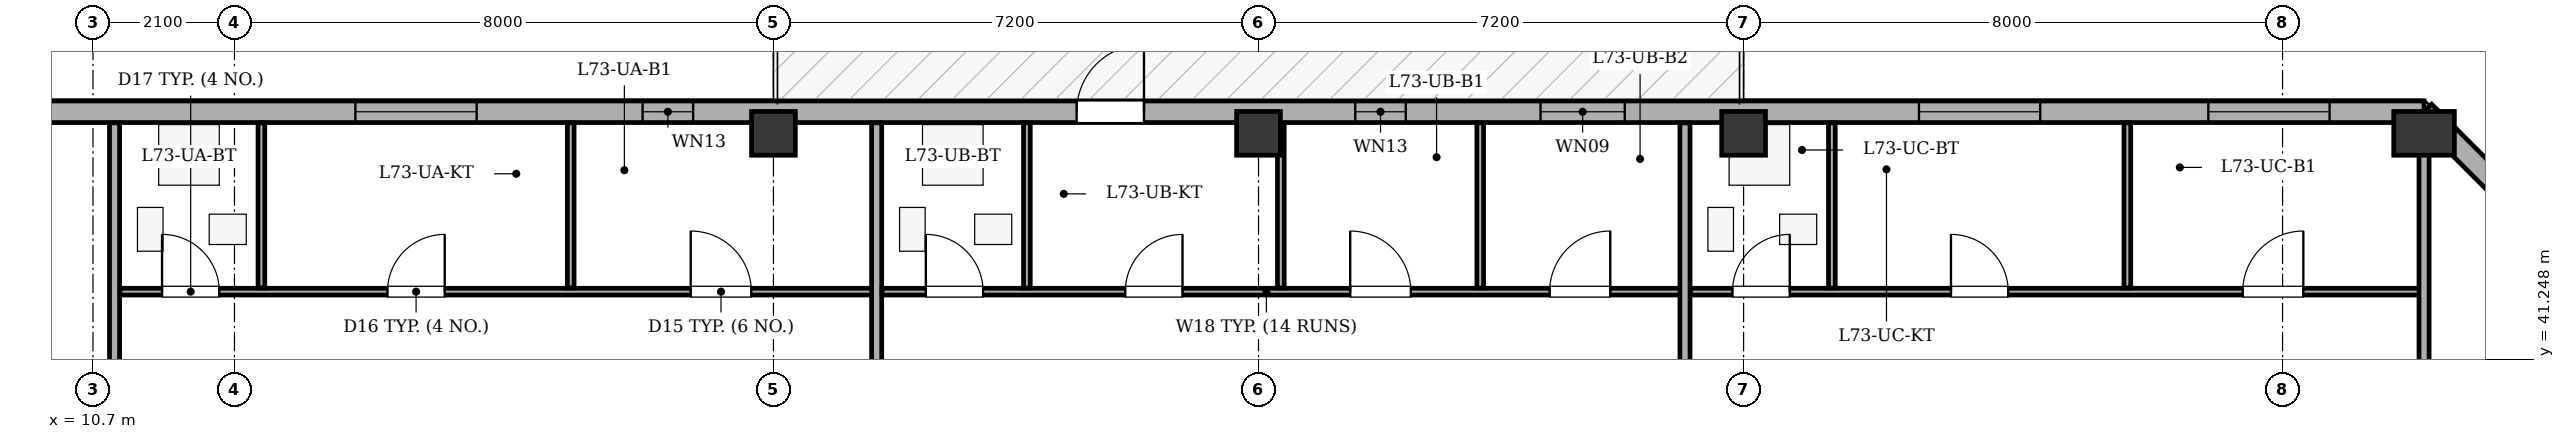
"""IFC4 building model, lengths in metres.
Left out: names, types, materials, properties, quantities, classifications, styles, units other than length and angle.
Written with IfcOpenShell. Run it as: python <this file> out.ifc"""

import sys

from ifc_helpers import new_model, si_unit, direction, frame, frame_2d, origin, origin_2d, place, context, subcontext, project, spatial, rectangle, extrude, element, fill, save


model = new_model("IFC4")
c1 = context("Model", 3, precision=1e-05, world=origin(), true_north=direction((0.0, 1.0)))
c2 = subcontext(c1, "Body", "Model", "MODEL_VIEW")
j1 = project(units=[si_unit("LENGTHUNIT", "METRE"), si_unit("PLANEANGLEUNIT", "RADIAN")], contexts=[c1])
p1 = place(None, origin())
s1 = spatial("IfcSite", under=j1, at=p1, CompositionType="ELEMENT")
p2 = place(p1, origin())
s2 = spatial("IfcBuilding", under=s1, at=p2, CompositionType="ELEMENT")
p3 = place(p2, frame((0.0, 0.0, 275.5)))
s3 = spatial("IfcBuildingStorey", under=s2, at=p3, CompositionType="ELEMENT", Elevation=275.5)
for number, where, z_axis, x_axis in (
    (1, (20.8, 44.6, 0.0), (0.0, 0.0, 1.0), (1.0, 0.0, 0.0)),
    (2, (28.0, 44.6, 0.0), (0.0, 0.0, 1.0), (1.0, 0.0, 0.0)),
    (3, (35.2, 44.6, 0.0), (0.0, 0.0, 1.0), (1.0, 0.0, 0.0)),
):
    element("IfcColumn", number, at=place(p3, frame(where, z_axis=z_axis, x_axis=x_axis)), inside=s3, PredefinedType="COLUMN", context=c2, shape_type="SweptSolid", body=[
        extrude(rectangle(XDim=0.65, YDim=0.65, at=origin_2d()), origin(), (0.0, 0.0, 1.0), 3.4),
    ])
p4 = place(p3, frame((45.3, 44.6, 0.0), z_axis=(0.0, 0.0, 1.0), x_axis=(1.0, 0.0, 0.0)))
e4 = element("IfcColumn", 4, at=p4, inside=s3, PredefinedType="COLUMN", context=c2, shape_type="SweptSolid", body=[
    extrude(rectangle(XDim=0.65, YDim=0.9, at=origin_2d()), origin(), (0.0, 0.0, 1.0), 3.4),
])
p5 = place(p3, frame((8.3, 44.92, 0.0), z_axis=(0.0, 0.0, 1.0), x_axis=(1.0, 0.0, 0.0)))
e5 = element("IfcWall", 5, at=p5, inside=s3, PredefinedType="STANDARD", context=c2, shape_type="SweptSolid", body=[
    extrude(rectangle(XDim=37.0, YDim=0.32, at=frame_2d((18.5, 0.0))), origin(), (0.0, 0.0, 1.0), 2.725),
])
p6 = place(p5, frame((17.0, 0.0, 0.0)))
e6 = element("IfcOpeningElement", 6, at=p6, cuts=e5, PredefinedType="OPENING", context=c2, shape_type="SweptSolid", body=[
    extrude(rectangle(XDim=1.0, YDim=2.02, at=frame_2d((0.5, 1.01))), frame((0.0, 0.17, 0.0), z_axis=(0.0, -1.0, 0.0), x_axis=(1.0, 0.0, 0.0)), (0.0, 0.0, 1.0), 0.34),
])
p7 = place(p5, frame((6.295, 0.0, 0.75)))
e7 = element("IfcOpeningElement", 7, at=p7, cuts=e5, PredefinedType="OPENING", context=c2, shape_type="SweptSolid", body=[
    extrude(rectangle(XDim=1.8, YDim=1.7, at=frame_2d((0.9, 0.85))), frame((0.0, 0.17, 0.0), z_axis=(0.0, -1.0, 0.0), x_axis=(1.0, 0.0, 0.0)), (0.0, 0.0, 1.0), 0.34),
])
p8 = place(p5, frame((23.886, 0.0, 0.75)))
e8 = element("IfcOpeningElement", 8, at=p8, cuts=e5, PredefinedType="OPENING", context=c2, shape_type="SweptSolid", body=[
    extrude(rectangle(XDim=1.25, YDim=1.7, at=frame_2d((0.625, 0.85))), frame((0.0, 0.17, 0.0), z_axis=(0.0, -1.0, 0.0), x_axis=(1.0, 0.0, 0.0)), (0.0, 0.0, 1.0), 0.34),
])
p9 = place(p5, frame((29.503, 0.0, 0.75)))
e9 = element("IfcOpeningElement", 9, at=p9, cuts=e5, PredefinedType="OPENING", context=c2, shape_type="SweptSolid", body=[
    extrude(rectangle(XDim=1.8, YDim=1.7, at=frame_2d((0.9, 0.85))), frame((0.0, 0.17, 0.0), z_axis=(0.0, -1.0, 0.0), x_axis=(1.0, 0.0, 0.0)), (0.0, 0.0, 1.0), 0.34),
])
p10 = place(p5, frame((33.798, 0.0, 0.75)))
e10 = element("IfcOpeningElement", 10, at=p10, cuts=e5, PredefinedType="OPENING", context=c2, shape_type="SweptSolid", body=[
    extrude(rectangle(XDim=1.8, YDim=1.7, at=frame_2d((0.9, 0.85))), frame((0.0, 0.17, 0.0), z_axis=(0.0, -1.0, 0.0), x_axis=(1.0, 0.0, 0.0)), (0.0, 0.0, 1.0), 0.34),
])
p11 = place(p5, frame((10.558, 0.0, 0.75)))
e11 = element("IfcOpeningElement", 11, at=p11, cuts=e5, PredefinedType="OPENING", context=c2, shape_type="SweptSolid", body=[
    extrude(rectangle(XDim=0.75, YDim=1.45, at=frame_2d((0.375, 0.725))), frame((0.0, 0.17, 0.0), z_axis=(0.0, -1.0, 0.0), x_axis=(1.0, 0.0, 0.0)), (0.0, 0.0, 1.0), 0.34),
])
p12 = place(p5, frame((21.136, 0.0, 0.75)))
e12 = element("IfcOpeningElement", 12, at=p12, cuts=e5, PredefinedType="OPENING", context=c2, shape_type="SweptSolid", body=[
    extrude(rectangle(XDim=0.75, YDim=1.45, at=frame_2d((0.375, 0.725))), frame((0.0, 0.17, 0.0), z_axis=(0.0, -1.0, 0.0), x_axis=(1.0, 0.0, 0.0)), (0.0, 0.0, 1.0), 0.34),
])
p13 = place(p3, frame((45.3, 44.92, 0.0), z_axis=(0.0, 0.0, 1.0), x_axis=(0.70712937715, -0.707084184501, 0.0)))
e13 = element("IfcWall", 13, at=p13, inside=s3, PredefinedType="STANDARD", context=c2, shape_type="SweptSolid", body=[
    extrude(rectangle(XDim=5.402, YDim=0.32, at=frame_2d((2.701, 0.0))), origin(), (0.0, 0.0, 1.0), 2.725),
])
p14 = place(p13, frame((2.001, 0.0, 0.75)))
e14 = element("IfcOpeningElement", 14, at=p14, cuts=e13, PredefinedType="OPENING", context=c2, shape_type="SweptSolid", body=[
    extrude(rectangle(XDim=1.4, YDim=1.65, at=frame_2d((0.7, 0.825))), frame((0.0, 0.17, 0.0), z_axis=(0.0, -1.0, 0.0), x_axis=(1.0, 0.0, 0.0)), (0.0, 0.0, 1.0), 0.34),
])
p15 = place(p3, frame((11.02, 36.1, 0.0), z_axis=(0.0, 0.0, 1.0), x_axis=(0.0, 1.0, 0.0)))
e15 = element("IfcWall", 15, at=p15, inside=s3, PredefinedType="PARTITIONING", context=c2, shape_type="SweptSolid", body=[
    extrude(rectangle(XDim=8.655, YDim=0.15, at=frame_2d((4.327, 0.0))), origin(), (0.0, 0.0, 1.0), 3.1),
])
p16 = place(p3, frame((11.1, 42.25, 0.0), z_axis=(0.0, 0.0, 1.0), x_axis=(1.0, 0.0, 0.0)))
e16 = element("IfcWall", 16, at=p16, inside=s3, PredefinedType="PARTITIONING", context=c2, shape_type="SweptSolid", body=[
    extrude(rectangle(XDim=11.272, YDim=0.1, at=frame_2d((5.636, 0.0))), origin(), (0.0, 0.0, 1.0), 3.1),
])
p17 = place(p16, frame((0.625, 0.0, 0.0)))
e17 = element("IfcOpeningElement", 17, at=p17, cuts=e16, PredefinedType="OPENING", context=c2, shape_type="SweptSolid", body=[
    extrude(rectangle(XDim=0.85, YDim=2.05, at=frame_2d((0.425, 1.025))), frame((0.0, 0.06, 0.0), z_axis=(0.0, -1.0, 0.0), x_axis=(1.0, 0.0, 0.0)), (0.0, 0.0, 1.0), 0.12),
])
p18 = place(p16, frame((3.971, 0.0, 0.0)))
e18 = element("IfcOpeningElement", 18, at=p18, cuts=e16, PredefinedType="OPENING", context=c2, shape_type="SweptSolid", body=[
    extrude(rectangle(XDim=0.85, YDim=2.05, at=frame_2d((0.425, 1.025))), frame((0.0, 0.06, 0.0), z_axis=(0.0, -1.0, 0.0), x_axis=(1.0, 0.0, 0.0)), (0.0, 0.0, 1.0), 0.12),
])
p19 = place(p16, frame((8.472, 0.0, 0.0)))
e19 = element("IfcOpeningElement", 19, at=p19, cuts=e16, PredefinedType="OPENING", context=c2, shape_type="SweptSolid", body=[
    extrude(rectangle(XDim=0.9, YDim=2.05, at=frame_2d((0.45, 1.025))), frame((0.0, 0.06, 0.0), z_axis=(0.0, -1.0, 0.0), x_axis=(1.0, 0.0, 0.0)), (0.0, 0.0, 1.0), 0.12),
])
p20 = place(p3, frame((13.2, 42.305, 0.0), z_axis=(0.0, 0.0, 1.0), x_axis=(0.0, 1.0, 0.0)))
e20 = element("IfcWall", 20, at=p20, inside=s3, PredefinedType="PARTITIONING", context=c2, shape_type="SweptSolid", body=[
    extrude(rectangle(XDim=2.45, YDim=0.1, at=frame_2d((1.225, 0.0))), origin(), (0.0, 0.0, 1.0), 3.1),
])
p21 = place(p3, frame((17.791, 42.305, 0.0), z_axis=(0.0, 0.0, 1.0), x_axis=(0.0, 1.0, 0.0)))
e21 = element("IfcWall", 21, at=p21, inside=s3, PredefinedType="PARTITIONING", context=c2, shape_type="SweptSolid", body=[
    extrude(rectangle(XDim=2.45, YDim=0.1, at=frame_2d((1.225, 0.0))), origin(), (0.0, 0.0, 1.0), 2.725),
])
p22 = place(p3, frame((22.332, 36.1, 0.0), z_axis=(0.0, 0.0, 1.0), x_axis=(0.0, 1.0, 0.0)))
e22 = element("IfcWall", 22, at=p22, inside=s3, PredefinedType="PARTITIONING", context=c2, shape_type="SweptSolid", body=[
    extrude(rectangle(XDim=8.655, YDim=0.15, at=frame_2d((4.327, 0.0))), origin(), (0.0, 0.0, 1.0), 2.725),
])
p23 = place(p3, frame((22.412, 42.25, 0.0), z_axis=(0.0, 0.0, 1.0), x_axis=(1.0, 0.0, 0.0)))
e23 = element("IfcWall", 23, at=p23, inside=s3, PredefinedType="PARTITIONING", context=c2, shape_type="SweptSolid", body=[
    extrude(rectangle(XDim=11.958, YDim=0.1, at=frame_2d((5.979, 0.0))), origin(), (0.0, 0.0, 1.0), 3.1),
])
p24 = place(p23, frame((0.65, 0.0, 0.0)))
e24 = element("IfcOpeningElement", 24, at=p24, cuts=e23, PredefinedType="OPENING", context=c2, shape_type="SweptSolid", body=[
    extrude(rectangle(XDim=0.85, YDim=2.05, at=frame_2d((0.425, 1.025))), frame((0.0, 0.06, 0.0), z_axis=(0.0, -1.0, 0.0), x_axis=(1.0, 0.0, 0.0)), (0.0, 0.0, 1.0), 0.12),
])
p25 = place(p23, frame((3.61, 0.0, 0.0)))
e25 = element("IfcOpeningElement", 25, at=p25, cuts=e23, PredefinedType="OPENING", context=c2, shape_type="SweptSolid", body=[
    extrude(rectangle(XDim=0.85, YDim=2.05, at=frame_2d((0.425, 1.025))), frame((0.0, 0.06, 0.0), z_axis=(0.0, -1.0, 0.0), x_axis=(1.0, 0.0, 0.0)), (0.0, 0.0, 1.0), 0.12),
])
p26 = place(p23, frame((6.949, 0.0, 0.0)))
e26 = element("IfcOpeningElement", 26, at=p26, cuts=e23, PredefinedType="OPENING", context=c2, shape_type="SweptSolid", body=[
    extrude(rectangle(XDim=0.9, YDim=2.05, at=frame_2d((0.45, 1.025))), frame((0.0, 0.06, 0.0), z_axis=(0.0, -1.0, 0.0), x_axis=(1.0, 0.0, 0.0)), (0.0, 0.0, 1.0), 0.12),
])
p27 = place(p23, frame((9.909, 0.0, 0.0)))
e27 = element("IfcOpeningElement", 27, at=p27, cuts=e23, PredefinedType="OPENING", context=c2, shape_type="SweptSolid", body=[
    extrude(rectangle(XDim=0.9, YDim=2.05, at=frame_2d((0.45, 1.025))), frame((0.0, 0.06, 0.0), z_axis=(0.0, -1.0, 0.0), x_axis=(1.0, 0.0, 0.0)), (0.0, 0.0, 1.0), 0.12),
])
for number, where, z_axis, x_axis in (
    (28, (24.562, 42.305, 0.0), (0.0, 0.0, 1.0), (0.0, 1.0, 0.0)),
    (29, (28.331, 42.305, 0.0), (0.0, 0.0, 1.0), (0.0, 1.0, 0.0)),
    (30, (31.291, 42.305, 0.0), (0.0, 0.0, 1.0), (0.0, 1.0, 0.0)),
):
    element("IfcWall", number, at=place(p3, frame(where, z_axis=z_axis, x_axis=x_axis)), inside=s3, PredefinedType="PARTITIONING", context=c2, shape_type="SweptSolid", body=[
        extrude(rectangle(XDim=2.45, YDim=0.1, at=frame_2d((1.225, 0.0))), origin(), (0.0, 0.0, 1.0), 3.1),
    ])
p28 = place(p3, frame((34.33, 36.1, 0.0), z_axis=(0.0, 0.0, 1.0), x_axis=(0.0, 1.0, 0.0)))
e31 = element("IfcWall", 31, at=p28, inside=s3, PredefinedType="PARTITIONING", context=c2, shape_type="SweptSolid", body=[
    extrude(rectangle(XDim=8.655, YDim=0.15, at=frame_2d((4.327, 0.0))), origin(), (0.0, 0.0, 1.0), 3.1),
])
p29 = place(p3, frame((34.41, 42.25, 0.0), z_axis=(0.0, 0.0, 1.0), x_axis=(1.0, 0.0, 0.0)))
e32 = element("IfcWall", 32, at=p29, inside=s3, PredefinedType="PARTITIONING", context=c2, shape_type="SweptSolid", body=[
    extrude(rectangle(XDim=10.93, YDim=0.1, at=frame_2d((5.465, 0.0))), origin(), (0.0, 0.0, 1.0), 3.1),
])
p30 = place(p29, frame((0.625, 0.0, 0.0)))
e33 = element("IfcOpeningElement", 33, at=p30, cuts=e32, PredefinedType="OPENING", context=c2, shape_type="SweptSolid", body=[
    extrude(rectangle(XDim=0.85, YDim=2.05, at=frame_2d((0.425, 1.025))), frame((0.0, 0.06, 0.0), z_axis=(0.0, -1.0, 0.0), x_axis=(1.0, 0.0, 0.0)), (0.0, 0.0, 1.0), 0.12),
])
p31 = place(p29, frame((3.868, 0.0, 0.0)))
e34 = element("IfcOpeningElement", 34, at=p31, cuts=e32, PredefinedType="OPENING", context=c2, shape_type="SweptSolid", body=[
    extrude(rectangle(XDim=0.85, YDim=2.05, at=frame_2d((0.425, 1.025))), frame((0.0, 0.06, 0.0), z_axis=(0.0, -1.0, 0.0), x_axis=(1.0, 0.0, 0.0)), (0.0, 0.0, 1.0), 0.12),
])
p32 = place(p29, frame((8.198, 0.0, 0.0)))
e35 = element("IfcOpeningElement", 35, at=p32, cuts=e32, PredefinedType="OPENING", context=c2, shape_type="SweptSolid", body=[
    extrude(rectangle(XDim=0.9, YDim=2.05, at=frame_2d((0.45, 1.025))), frame((0.0, 0.06, 0.0), z_axis=(0.0, -1.0, 0.0), x_axis=(1.0, 0.0, 0.0)), (0.0, 0.0, 1.0), 0.12),
])
p33 = place(p3, frame((36.51, 42.305, 0.0), z_axis=(0.0, 0.0, 1.0), x_axis=(0.0, 1.0, 0.0)))
e36 = element("IfcWall", 36, at=p33, inside=s3, PredefinedType="PARTITIONING", context=c2, shape_type="SweptSolid", body=[
    extrude(rectangle(XDim=2.45, YDim=0.1, at=frame_2d((1.225, 0.0))), origin(), (0.0, 0.0, 1.0), 2.725),
])
p34 = place(p3, frame((40.896, 42.305, 0.0), z_axis=(0.0, 0.0, 1.0), x_axis=(0.0, 1.0, 0.0)))
e37 = element("IfcWall", 37, at=p34, inside=s3, PredefinedType="PARTITIONING", context=c2, shape_type="SweptSolid", body=[
    extrude(rectangle(XDim=2.45, YDim=0.1, at=frame_2d((1.225, 0.0))), origin(), (0.0, 0.0, 1.0), 3.1),
])
p35 = place(p3, frame((45.3, 36.1, 0.0), z_axis=(0.0, 0.0, 1.0), x_axis=(0.0, 1.0, 0.0)))
e38 = element("IfcWall", 38, at=p35, inside=s3, PredefinedType="PARTITIONING", context=c2, shape_type="SweptSolid", body=[
    extrude(rectangle(XDim=8.655, YDim=0.15, at=frame_2d((4.327, 0.0))), origin(), (0.0, 0.0, 1.0), 3.1),
])
p36 = place(p6, origin())
e39 = element("IfcDoor", 39, at=p36, inside=s3, OperationType="SINGLE_SWING_RIGHT", PredefinedType="DOOR", context=c2, shape_type="SweptSolid", body=[
    extrude(rectangle(XDim=1.0, YDim=2.02, at=frame_2d((0.5, 1.01))), frame((0.0, 0.025, 0.0), z_axis=(0.0, -1.0, 0.0), x_axis=(1.0, 0.0, 0.0)), (0.0, 0.0, 1.0), 0.05),
])
fill(e6, e39)
p37 = place(p7, origin())
e40 = element("IfcWindow", 40, at=p37, inside=s3, PartitioningType="SINGLE_PANEL", PredefinedType="WINDOW", context=c2, shape_type="SweptSolid", body=[
    extrude(rectangle(XDim=1.8, YDim=1.7, at=frame_2d((0.9, 0.85))), frame((0.0, -0.01, 0.0), z_axis=(0.0, -1.0, 0.0), x_axis=(1.0, 0.0, 0.0)), (0.0, 0.0, 1.0), 0.06),
])
fill(e7, e40)
p38 = place(p8, origin())
e41 = element("IfcWindow", 41, at=p38, inside=s3, PartitioningType="SINGLE_PANEL", PredefinedType="WINDOW", context=c2, shape_type="SweptSolid", body=[
    extrude(rectangle(XDim=1.25, YDim=1.7, at=frame_2d((0.625, 0.85))), frame((0.0, -0.01, 0.0), z_axis=(0.0, -1.0, 0.0), x_axis=(1.0, 0.0, 0.0)), (0.0, 0.0, 1.0), 0.06),
])
fill(e8, e41)
p39 = place(p9, origin())
e42 = element("IfcWindow", 42, at=p39, inside=s3, PartitioningType="SINGLE_PANEL", PredefinedType="WINDOW", context=c2, shape_type="SweptSolid", body=[
    extrude(rectangle(XDim=1.8, YDim=1.7, at=frame_2d((0.9, 0.85))), frame((0.0, -0.01, 0.0), z_axis=(0.0, -1.0, 0.0), x_axis=(1.0, 0.0, 0.0)), (0.0, 0.0, 1.0), 0.06),
])
fill(e9, e42)
p40 = place(p10, origin())
e43 = element("IfcWindow", 43, at=p40, inside=s3, PartitioningType="SINGLE_PANEL", PredefinedType="WINDOW", context=c2, shape_type="SweptSolid", body=[
    extrude(rectangle(XDim=1.8, YDim=1.7, at=frame_2d((0.9, 0.85))), frame((0.0, -0.01, 0.0), z_axis=(0.0, -1.0, 0.0), x_axis=(1.0, 0.0, 0.0)), (0.0, 0.0, 1.0), 0.06),
])
fill(e10, e43)
p41 = place(p11, origin())
e44 = element("IfcWindow", 44, at=p41, inside=s3, PartitioningType="SINGLE_PANEL", PredefinedType="WINDOW", context=c2, shape_type="SweptSolid", body=[
    extrude(rectangle(XDim=0.75, YDim=1.45, at=frame_2d((0.375, 0.725))), frame((0.0, -0.01, 0.0), z_axis=(0.0, -1.0, 0.0), x_axis=(1.0, 0.0, 0.0)), (0.0, 0.0, 1.0), 0.06),
])
fill(e11, e44)
p42 = place(p12, origin())
e45 = element("IfcWindow", 45, at=p42, inside=s3, PartitioningType="SINGLE_PANEL", PredefinedType="WINDOW", context=c2, shape_type="SweptSolid", body=[
    extrude(rectangle(XDim=0.75, YDim=1.45, at=frame_2d((0.375, 0.725))), frame((0.0, -0.01, 0.0), z_axis=(0.0, -1.0, 0.0), x_axis=(1.0, 0.0, 0.0)), (0.0, 0.0, 1.0), 0.06),
])
fill(e12, e45)
p43 = place(p17, origin())
e46 = element("IfcDoor", 46, at=p43, inside=s3, OperationType="SINGLE_SWING_LEFT", PredefinedType="DOOR", context=c2, shape_type="SweptSolid", body=[
    extrude(rectangle(XDim=0.85, YDim=2.05, at=frame_2d((0.425, 1.025))), frame((0.0, 0.025, 0.0), z_axis=(0.0, -1.0, 0.0), x_axis=(1.0, 0.0, 0.0)), (0.0, 0.0, 1.0), 0.05),
])
fill(e17, e46)
p44 = place(p18, origin())
e47 = element("IfcDoor", 47, at=p44, inside=s3, OperationType="SINGLE_SWING_RIGHT", PredefinedType="DOOR", context=c2, shape_type="SweptSolid", body=[
    extrude(rectangle(XDim=0.85, YDim=2.05, at=frame_2d((0.425, 1.025))), frame((0.0, 0.025, 0.0), z_axis=(0.0, -1.0, 0.0), x_axis=(1.0, 0.0, 0.0)), (0.0, 0.0, 1.0), 0.05),
])
fill(e18, e47)
p45 = place(p19, origin())
e48 = element("IfcDoor", 48, at=p45, inside=s3, OperationType="SINGLE_SWING_LEFT", PredefinedType="DOOR", context=c2, shape_type="SweptSolid", body=[
    extrude(rectangle(XDim=0.9, YDim=2.05, at=frame_2d((0.45, 1.025))), frame((0.0, 0.025, 0.0), z_axis=(0.0, -1.0, 0.0), x_axis=(1.0, 0.0, 0.0)), (0.0, 0.0, 1.0), 0.05),
])
fill(e19, e48)
p46 = place(p24, origin())
e49 = element("IfcDoor", 49, at=p46, inside=s3, OperationType="SINGLE_SWING_LEFT", PredefinedType="DOOR", context=c2, shape_type="SweptSolid", body=[
    extrude(rectangle(XDim=0.85, YDim=2.05, at=frame_2d((0.425, 1.025))), frame((0.0, 0.025, 0.0), z_axis=(0.0, -1.0, 0.0), x_axis=(1.0, 0.0, 0.0)), (0.0, 0.0, 1.0), 0.05),
])
fill(e24, e49)
p47 = place(p25, origin())
e50 = element("IfcDoor", 50, at=p47, inside=s3, OperationType="SINGLE_SWING_RIGHT", PredefinedType="DOOR", context=c2, shape_type="SweptSolid", body=[
    extrude(rectangle(XDim=0.85, YDim=2.05, at=frame_2d((0.425, 1.025))), frame((0.0, 0.025, 0.0), z_axis=(0.0, -1.0, 0.0), x_axis=(1.0, 0.0, 0.0)), (0.0, 0.0, 1.0), 0.05),
])
fill(e25, e50)
p48 = place(p26, origin())
e51 = element("IfcDoor", 51, at=p48, inside=s3, OperationType="SINGLE_SWING_LEFT", PredefinedType="DOOR", context=c2, shape_type="SweptSolid", body=[
    extrude(rectangle(XDim=0.9, YDim=2.05, at=frame_2d((0.45, 1.025))), frame((0.0, 0.025, 0.0), z_axis=(0.0, -1.0, 0.0), x_axis=(1.0, 0.0, 0.0)), (0.0, 0.0, 1.0), 0.05),
])
fill(e26, e51)
p49 = place(p27, origin())
e52 = element("IfcDoor", 52, at=p49, inside=s3, OperationType="SINGLE_SWING_RIGHT", PredefinedType="DOOR", context=c2, shape_type="SweptSolid", body=[
    extrude(rectangle(XDim=0.9, YDim=2.05, at=frame_2d((0.45, 1.025))), frame((0.0, 0.025, 0.0), z_axis=(0.0, -1.0, 0.0), x_axis=(1.0, 0.0, 0.0)), (0.0, 0.0, 1.0), 0.05),
])
fill(e27, e52)
p50 = place(p30, origin())
e53 = element("IfcDoor", 53, at=p50, inside=s3, OperationType="SINGLE_SWING_RIGHT", PredefinedType="DOOR", context=c2, shape_type="SweptSolid", body=[
    extrude(rectangle(XDim=0.85, YDim=2.05, at=frame_2d((0.425, 1.025))), frame((0.0, 0.025, 0.0), z_axis=(0.0, -1.0, 0.0), x_axis=(1.0, 0.0, 0.0)), (0.0, 0.0, 1.0), 0.05),
])
fill(e33, e53)
p51 = place(p31, origin())
e54 = element("IfcDoor", 54, at=p51, inside=s3, OperationType="SINGLE_SWING_LEFT", PredefinedType="DOOR", context=c2, shape_type="SweptSolid", body=[
    extrude(rectangle(XDim=0.85, YDim=2.05, at=frame_2d((0.425, 1.025))), frame((0.0, 0.025, 0.0), z_axis=(0.0, -1.0, 0.0), x_axis=(1.0, 0.0, 0.0)), (0.0, 0.0, 1.0), 0.05),
])
fill(e34, e54)
p52 = place(p32, origin())
e55 = element("IfcDoor", 55, at=p52, inside=s3, OperationType="SINGLE_SWING_RIGHT", PredefinedType="DOOR", context=c2, shape_type="SweptSolid", body=[
    extrude(rectangle(XDim=0.9, YDim=2.05, at=frame_2d((0.45, 1.025))), frame((0.0, 0.025, 0.0), z_axis=(0.0, -1.0, 0.0), x_axis=(1.0, 0.0, 0.0)), (0.0, 0.0, 1.0), 0.05),
])
fill(e35, e55)
save(model, sys.argv[1])
